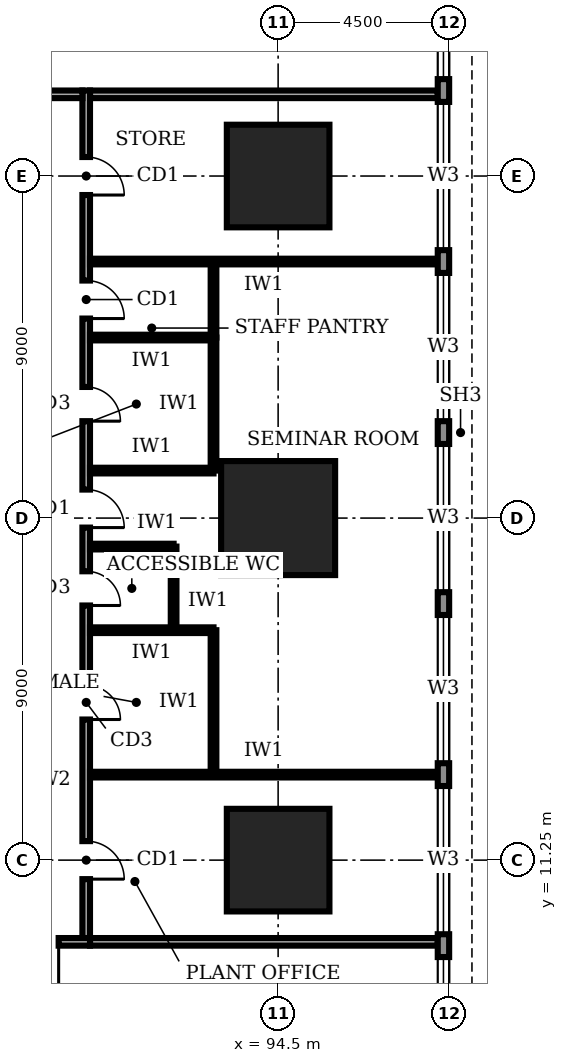
"""IFC4 building model, lengths in metres.
Left out: names, types, materials, properties, quantities, classifications, styles, units other than length and angle.
Written with IfcOpenShell. Run it as: python <this file> out.ifc"""

import sys

from ifc_helpers import new_model, si_unit, direction, frame, frame_2d, origin, origin_2d, place, context, subcontext, project, spatial, rectangle, extrude, element, fill, save


model = new_model("IFC4")
c1 = context("Model", 3, precision=1e-05, world=origin(), true_north=direction((0.0, 1.0)))
c2 = subcontext(c1, "Body", "Model", "MODEL_VIEW")
j1 = project(units=[si_unit("LENGTHUNIT", "METRE"), si_unit("PLANEANGLEUNIT", "RADIAN")], contexts=[c1])
p1 = place(None, origin())
s1 = spatial("IfcSite", under=j1, at=p1, CompositionType="ELEMENT")
p2 = place(p1, origin())
s2 = spatial("IfcBuilding", under=s1, at=p2, CompositionType="ELEMENT")
p3 = place(p2, frame((0.0, 0.0, 16.0)))
s3 = spatial("IfcBuildingStorey", under=s2, at=p3, CompositionType="ELEMENT", Elevation=16.0)
p4 = place(p3, frame((94.5, 11.25, 0.0), z_axis=(0.0, 0.0, 1.0), x_axis=(1.0, 0.0, 0.0)))
e1 = element("IfcColumn", 1, at=p4, inside=s3, PredefinedType="COLUMN", context=c2, shape_type="SweptSolid", body=[
    extrude(rectangle(XDim=2.7, YDim=2.7, at=origin_2d()), origin(), (0.0, 0.0, 1.0), 5.0),
])
p5 = place(p3, frame((94.5, 20.25, 0.0), z_axis=(0.0, 0.0, 1.0), x_axis=(1.0, 0.0, 0.0)))
e2 = element("IfcColumn", 2, at=p5, inside=s3, PredefinedType="COLUMN", context=c2, shape_type="SweptSolid", body=[
    extrude(rectangle(XDim=3.0, YDim=3.0, at=origin_2d()), origin(), (0.0, 0.0, 1.0), 5.0),
])
p6 = place(p3, frame((94.5, 29.25, 0.0), z_axis=(0.0, 0.0, 1.0), x_axis=(1.0, 0.0, 0.0)))
e3 = element("IfcColumn", 3, at=p6, inside=s3, PredefinedType="COLUMN", context=c2, shape_type="SweptSolid", body=[
    extrude(rectangle(XDim=2.7, YDim=2.7, at=origin_2d()), origin(), (0.0, 0.0, 1.0), 5.0),
])
p7 = place(p3, frame((98.85, -4.48, 0.0), z_axis=(0.0, 0.0, 1.0), x_axis=(0.0, 1.0, 0.0)))
e4 = element("IfcWall", 4, at=p7, inside=s3, PredefinedType="STANDARD", context=c2, shape_type="SweptSolid", body=[
    extrude(rectangle(XDim=53.96, YDim=0.3, at=frame_2d((26.98, 0.0))), origin(), (0.0, 0.0, 1.0), 4.7),
])
p8 = place(p7, frame((4.78, 0.0, 0.95)))
e5 = element("IfcOpeningElement", 5, at=p8, cuts=e4, PredefinedType="OPENING", context=c2, shape_type="SweptSolid", body=[
    extrude(rectangle(XDim=3.9, YDim=1.8, at=frame_2d((1.95, 0.9))), frame((0.0, 0.16, 0.0), z_axis=(0.0, -1.0, 0.0), x_axis=(1.0, 0.0, 0.0)), (0.0, 0.0, 1.0), 0.32),
])
p9 = place(p7, frame((9.28, 0.0, 0.95)))
e6 = element("IfcOpeningElement", 6, at=p9, cuts=e4, PredefinedType="OPENING", context=c2, shape_type="SweptSolid", body=[
    extrude(rectangle(XDim=3.9, YDim=1.8, at=frame_2d((1.95, 0.9))), frame((0.0, 0.16, 0.0), z_axis=(0.0, -1.0, 0.0), x_axis=(1.0, 0.0, 0.0)), (0.0, 0.0, 1.0), 0.32),
])
p10 = place(p7, frame((13.78, 0.0, 0.95)))
e7 = element("IfcOpeningElement", 7, at=p10, cuts=e4, PredefinedType="OPENING", context=c2, shape_type="SweptSolid", body=[
    extrude(rectangle(XDim=3.9, YDim=1.8, at=frame_2d((1.95, 0.9))), frame((0.0, 0.16, 0.0), z_axis=(0.0, -1.0, 0.0), x_axis=(1.0, 0.0, 0.0)), (0.0, 0.0, 1.0), 0.32),
])
p11 = place(p7, frame((18.28, 0.0, 0.95)))
e8 = element("IfcOpeningElement", 8, at=p11, cuts=e4, PredefinedType="OPENING", context=c2, shape_type="SweptSolid", body=[
    extrude(rectangle(XDim=3.9, YDim=1.8, at=frame_2d((1.95, 0.9))), frame((0.0, 0.16, 0.0), z_axis=(0.0, -1.0, 0.0), x_axis=(1.0, 0.0, 0.0)), (0.0, 0.0, 1.0), 0.32),
])
p12 = place(p7, frame((22.78, 0.0, 0.95)))
e9 = element("IfcOpeningElement", 9, at=p12, cuts=e4, PredefinedType="OPENING", context=c2, shape_type="SweptSolid", body=[
    extrude(rectangle(XDim=3.9, YDim=1.8, at=frame_2d((1.95, 0.9))), frame((0.0, 0.16, 0.0), z_axis=(0.0, -1.0, 0.0), x_axis=(1.0, 0.0, 0.0)), (0.0, 0.0, 1.0), 0.32),
])
p13 = place(p7, frame((27.28, 0.0, 0.95)))
e10 = element("IfcOpeningElement", 10, at=p13, cuts=e4, PredefinedType="OPENING", context=c2, shape_type="SweptSolid", body=[
    extrude(rectangle(XDim=3.9, YDim=1.8, at=frame_2d((1.95, 0.9))), frame((0.0, 0.16, 0.0), z_axis=(0.0, -1.0, 0.0), x_axis=(1.0, 0.0, 0.0)), (0.0, 0.0, 1.0), 0.32),
])
p14 = place(p7, frame((31.78, 0.0, 0.95)))
e11 = element("IfcOpeningElement", 11, at=p14, cuts=e4, PredefinedType="OPENING", context=c2, shape_type="SweptSolid", body=[
    extrude(rectangle(XDim=3.9, YDim=1.8, at=frame_2d((1.95, 0.9))), frame((0.0, 0.16, 0.0), z_axis=(0.0, -1.0, 0.0), x_axis=(1.0, 0.0, 0.0)), (0.0, 0.0, 1.0), 0.32),
])
p15 = place(p7, frame((36.28, 0.0, 0.95)))
e12 = element("IfcOpeningElement", 12, at=p15, cuts=e4, PredefinedType="OPENING", context=c2, shape_type="SweptSolid", body=[
    extrude(rectangle(XDim=3.9, YDim=1.8, at=frame_2d((1.95, 0.9))), frame((0.0, 0.16, 0.0), z_axis=(0.0, -1.0, 0.0), x_axis=(1.0, 0.0, 0.0)), (0.0, 0.0, 1.0), 0.32),
])
p16 = place(p7, frame((40.78, 0.0, 0.95)))
e13 = element("IfcOpeningElement", 13, at=p16, cuts=e4, PredefinedType="OPENING", context=c2, shape_type="SweptSolid", body=[
    extrude(rectangle(XDim=3.9, YDim=1.8, at=frame_2d((1.95, 0.9))), frame((0.0, 0.16, 0.0), z_axis=(0.0, -1.0, 0.0), x_axis=(1.0, 0.0, 0.0)), (0.0, 0.0, 1.0), 0.32),
])
p17 = place(p7, frame((45.28, 0.0, 0.95)))
e14 = element("IfcOpeningElement", 14, at=p17, cuts=e4, PredefinedType="OPENING", context=c2, shape_type="SweptSolid", body=[
    extrude(rectangle(XDim=3.9, YDim=1.8, at=frame_2d((1.95, 0.9))), frame((0.0, 0.16, 0.0), z_axis=(0.0, -1.0, 0.0), x_axis=(1.0, 0.0, 0.0)), (0.0, 0.0, 1.0), 0.32),
])
p18 = place(p7, frame((49.78, 0.0, 0.95)))
e15 = element("IfcOpeningElement", 15, at=p18, cuts=e4, PredefinedType="OPENING", context=c2, shape_type="SweptSolid", body=[
    extrude(rectangle(XDim=3.9, YDim=1.8, at=frame_2d((1.95, 0.9))), frame((0.0, 0.16, 0.0), z_axis=(0.0, -1.0, 0.0), x_axis=(1.0, 0.0, 0.0)), (0.0, 0.0, 1.0), 0.32),
])
p19 = place(p3, frame((72.65, 9.1, 0.0), z_axis=(0.0, 0.0, 1.0), x_axis=(1.0, 0.0, 0.0)))
e16 = element("IfcWall", 16, at=p19, inside=s3, PredefinedType="SOLIDWALL", context=c2, shape_type="SweptSolid", body=[
    extrude(rectangle(XDim=16.9, YDim=0.2, at=frame_2d((8.45, 0.0))), origin(), (0.0, 0.0, 1.0), 4.7),
])
p20 = place(p19, frame((0.925, 0.0, 0.0)))
e17 = element("IfcOpeningElement", 17, at=p20, cuts=e16, PredefinedType="OPENING", context=c2, shape_type="SweptSolid", body=[
    extrude(rectangle(XDim=1.8, YDim=2.1, at=frame_2d((0.9, 1.05))), frame((0.0, 0.11, 0.0), z_axis=(0.0, -1.0, 0.0), x_axis=(1.0, 0.0, 0.0)), (0.0, 0.0, 1.0), 0.22),
])
p21 = place(p19, frame((4.9, 0.0, 0.0)))
e18 = element("IfcOpeningElement", 18, at=p21, cuts=e16, PredefinedType="OPENING", context=c2, shape_type="SweptSolid", body=[
    extrude(rectangle(XDim=2.4, YDim=2.7, at=frame_2d((1.2, 1.35))), frame((0.0, 0.11, 0.0), z_axis=(0.0, -1.0, 0.0), x_axis=(1.0, 0.0, 0.0)), (0.0, 0.0, 1.0), 0.22),
])
p22 = place(p19, frame((9.4, 0.0, 0.0)))
e19 = element("IfcOpeningElement", 19, at=p22, cuts=e16, PredefinedType="OPENING", context=c2, shape_type="SweptSolid", body=[
    extrude(rectangle(XDim=2.4, YDim=2.7, at=frame_2d((1.2, 1.35))), frame((0.0, 0.11, 0.0), z_axis=(0.0, -1.0, 0.0), x_axis=(1.0, 0.0, 0.0)), (0.0, 0.0, 1.0), 0.22),
])
p23 = place(p19, frame((13.675, 0.0, 0.0)))
e20 = element("IfcOpeningElement", 20, at=p23, cuts=e16, PredefinedType="OPENING", context=c2, shape_type="SweptSolid", body=[
    extrude(rectangle(XDim=2.4, YDim=2.7, at=frame_2d((1.2, 1.35))), frame((0.0, 0.11, 0.0), z_axis=(0.0, -1.0, 0.0), x_axis=(1.0, 0.0, 0.0)), (0.0, 0.0, 1.0), 0.22),
])
p24 = place(p3, frame((89.45, 9.2, 0.0), z_axis=(0.0, 0.0, 1.0), x_axis=(0.0, 1.0, 0.0)))
e21 = element("IfcWall", 21, at=p24, inside=s3, PredefinedType="SOLIDWALL", context=c2, shape_type="SweptSolid", body=[
    extrude(rectangle(XDim=22.3, YDim=0.2, at=frame_2d((11.15, 0.0))), origin(), (0.0, 0.0, 1.0), 4.7),
])
p25 = place(p24, frame((1.55, 0.0, 0.0)))
e22 = element("IfcOpeningElement", 22, at=p25, cuts=e21, PredefinedType="OPENING", context=c2, shape_type="SweptSolid", body=[
    extrude(rectangle(XDim=1.0, YDim=2.1, at=frame_2d((0.5, 1.05))), frame((0.0, 0.11, 0.0), z_axis=(0.0, -1.0, 0.0), x_axis=(1.0, 0.0, 0.0)), (0.0, 0.0, 1.0), 0.22),
])
p26 = place(p24, frame((5.75, 0.0, 0.0)))
e23 = element("IfcOpeningElement", 23, at=p26, cuts=e21, PredefinedType="OPENING", context=c2, shape_type="SweptSolid", body=[
    extrude(rectangle(XDim=0.9, YDim=2.1, at=frame_2d((0.45, 1.05))), frame((0.0, 0.11, 0.0), z_axis=(0.0, -1.0, 0.0), x_axis=(1.0, 0.0, 0.0)), (0.0, 0.0, 1.0), 0.22),
])
p27 = place(p24, frame((8.75, 0.0, 0.0)))
e24 = element("IfcOpeningElement", 24, at=p27, cuts=e21, PredefinedType="OPENING", context=c2, shape_type="SweptSolid", body=[
    extrude(rectangle(XDim=0.9, YDim=2.1, at=frame_2d((0.45, 1.05))), frame((0.0, 0.11, 0.0), z_axis=(0.0, -1.0, 0.0), x_axis=(1.0, 0.0, 0.0)), (0.0, 0.0, 1.0), 0.22),
])
p28 = place(p24, frame((13.6, 0.0, 0.0)))
e25 = element("IfcOpeningElement", 25, at=p28, cuts=e21, PredefinedType="OPENING", context=c2, shape_type="SweptSolid", body=[
    extrude(rectangle(XDim=0.9, YDim=2.1, at=frame_2d((0.45, 1.05))), frame((0.0, 0.11, 0.0), z_axis=(0.0, -1.0, 0.0), x_axis=(1.0, 0.0, 0.0)), (0.0, 0.0, 1.0), 0.22),
])
p29 = place(p24, frame((16.3, 0.0, 0.0)))
e26 = element("IfcOpeningElement", 26, at=p29, cuts=e21, PredefinedType="OPENING", context=c2, shape_type="SweptSolid", body=[
    extrude(rectangle(XDim=1.0, YDim=2.1, at=frame_2d((0.5, 1.05))), frame((0.0, 0.11, 0.0), z_axis=(0.0, -1.0, 0.0), x_axis=(1.0, 0.0, 0.0)), (0.0, 0.0, 1.0), 0.22),
])
p30 = place(p24, frame((10.8, 0.0, 0.0)))
e27 = element("IfcOpeningElement", 27, at=p30, cuts=e21, PredefinedType="OPENING", context=c2, shape_type="SweptSolid", body=[
    extrude(rectangle(XDim=1.0, YDim=2.1, at=frame_2d((0.5, 1.05))), frame((0.0, 0.11, 0.0), z_axis=(0.0, -1.0, 0.0), x_axis=(1.0, 0.0, 0.0)), (0.0, 0.0, 1.0), 0.22),
])
p31 = place(p24, frame((19.55, 0.0, 0.0)))
e28 = element("IfcOpeningElement", 28, at=p31, cuts=e21, PredefinedType="OPENING", context=c2, shape_type="SweptSolid", body=[
    extrude(rectangle(XDim=1.0, YDim=2.1, at=frame_2d((0.5, 1.05))), frame((0.0, 0.11, 0.0), z_axis=(0.0, -1.0, 0.0), x_axis=(1.0, 0.0, 0.0)), (0.0, 0.0, 1.0), 0.22),
])
p32 = place(p3, frame((89.35, 31.4, 0.0), z_axis=(0.0, 0.0, 1.0), x_axis=(-1.0, 0.0, 0.0)))
e29 = element("IfcWall", 29, at=p32, inside=s3, PredefinedType="SOLIDWALL", context=c2, shape_type="SweptSolid", body=[
    extrude(rectangle(XDim=16.9, YDim=0.2, at=frame_2d((8.45, 0.0))), origin(), (0.0, 0.0, 1.0), 4.7),
])
p33 = place(p32, frame((13.925, 0.0, 0.0)))
e30 = element("IfcOpeningElement", 30, at=p33, cuts=e29, PredefinedType="OPENING", context=c2, shape_type="SweptSolid", body=[
    extrude(rectangle(XDim=1.8, YDim=2.1, at=frame_2d((0.9, 1.05))), frame((0.0, 0.11, 0.0), z_axis=(0.0, -1.0, 0.0), x_axis=(1.0, 0.0, 0.0)), (0.0, 0.0, 1.0), 0.22),
])
p34 = place(p32, frame((9.4, 0.0, 0.0)))
e31 = element("IfcOpeningElement", 31, at=p34, cuts=e29, PredefinedType="OPENING", context=c2, shape_type="SweptSolid", body=[
    extrude(rectangle(XDim=2.4, YDim=2.7, at=frame_2d((1.2, 1.35))), frame((0.0, 0.11, 0.0), z_axis=(0.0, -1.0, 0.0), x_axis=(1.0, 0.0, 0.0)), (0.0, 0.0, 1.0), 0.22),
])
p35 = place(p32, frame((0.925, 0.0, 0.0)))
e32 = element("IfcOpeningElement", 32, at=p35, cuts=e29, PredefinedType="OPENING", context=c2, shape_type="SweptSolid", body=[
    extrude(rectangle(XDim=1.8, YDim=2.1, at=frame_2d((0.9, 1.05))), frame((0.0, 0.11, 0.0), z_axis=(0.0, -1.0, 0.0), x_axis=(1.0, 0.0, 0.0)), (0.0, 0.0, 1.0), 0.22),
])
p36 = place(p32, frame((5.6, 0.0, 0.0)))
e33 = element("IfcOpeningElement", 33, at=p36, cuts=e29, PredefinedType="OPENING", context=c2, shape_type="SweptSolid", body=[
    extrude(rectangle(XDim=1.0, YDim=2.1, at=frame_2d((0.5, 1.05))), frame((0.0, 0.11, 0.0), z_axis=(0.0, -1.0, 0.0), x_axis=(1.0, 0.0, 0.0)), (0.0, 0.0, 1.0), 0.22),
])
for number, where, z_axis, x_axis in (
    (34, (89.55, 9.1, 0.0), (0.0, 0.0, 1.0), (1.0, 0.0, 0.0)),
    (35, (89.55, 31.4, 0.0), (0.0, 0.0, 1.0), (1.0, 0.0, 0.0)),
):
    element("IfcWall", number, at=place(p3, frame(where, z_axis=z_axis, x_axis=x_axis)), inside=s3, PredefinedType="SOLIDWALL", context=c2, shape_type="SweptSolid", body=[
        extrude(rectangle(XDim=9.15, YDim=0.2, at=frame_2d((4.575, 0.0))), origin(), (0.0, 0.0, 1.0), 4.7),
    ])
for number, where, z_axis, x_axis in (
    (36, (89.55, 13.5, 0.0), (0.0, 0.0, 1.0), (1.0, 0.0, 0.0)),
    (37, (89.55, 27.0, 0.0), (0.0, 0.0, 1.0), (1.0, 0.0, 0.0)),
):
    element("IfcWall", number, at=place(p3, frame(where, z_axis=z_axis, x_axis=x_axis)), inside=s3, PredefinedType="PARTITIONING", context=c2, shape_type="SweptSolid", body=[
        extrude(rectangle(XDim=9.15, YDim=0.15, at=frame_2d((4.575, 0.0))), origin(), (0.0, 0.0, 1.0), 4.7),
    ])
p37 = place(p3, frame((89.55, 17.3, 0.0), z_axis=(0.0, 0.0, 1.0), x_axis=(1.0, 0.0, 0.0)))
e38 = element("IfcWall", 38, at=p37, inside=s3, PredefinedType="PARTITIONING", context=c2, shape_type="SweptSolid", body=[
    extrude(rectangle(XDim=3.25, YDim=0.15, at=frame_2d((1.625, 0.0))), origin(), (0.0, 0.0, 1.0), 4.7),
])
p38 = place(p3, frame((89.55, 19.5, 0.0), z_axis=(0.0, 0.0, 1.0), x_axis=(1.0, 0.0, 0.0)))
e39 = element("IfcWall", 39, at=p38, inside=s3, PredefinedType="PARTITIONING", context=c2, shape_type="SweptSolid", body=[
    extrude(rectangle(XDim=2.2, YDim=0.15, at=frame_2d((1.1, 0.0))), origin(), (0.0, 0.0, 1.0), 3.8),
])
for number, where, z_axis, x_axis in (
    (40, (89.55, 21.5, 0.0), (0.0, 0.0, 1.0), (1.0, 0.0, 0.0)),
    (41, (89.55, 25.0, 0.0), (0.0, 0.0, 1.0), (1.0, 0.0, 0.0)),
):
    element("IfcWall", number, at=place(p3, frame(where, z_axis=z_axis, x_axis=x_axis)), inside=s3, PredefinedType="PARTITIONING", context=c2, shape_type="SweptSolid", body=[
        extrude(rectangle(XDim=3.25, YDim=0.15, at=frame_2d((1.625, 0.0))), origin(), (0.0, 0.0, 1.0), 4.7),
    ])
p39 = place(p3, frame((92.8, 13.5, 0.0), z_axis=(0.0, 0.0, 1.0), x_axis=(0.0, 1.0, 0.0)))
e42 = element("IfcWall", 42, at=p39, inside=s3, PredefinedType="PARTITIONING", context=c2, shape_type="SweptSolid", body=[
    extrude(rectangle(XDim=3.8, YDim=0.15, at=frame_2d((1.9, 0.0))), origin(), (0.0, 0.0, 1.0), 4.7),
])
p40 = place(p3, frame((91.75, 17.3, 0.0), z_axis=(0.0, 0.0, 1.0), x_axis=(0.0, 1.0, 0.0)))
e43 = element("IfcWall", 43, at=p40, inside=s3, PredefinedType="PARTITIONING", context=c2, shape_type="SweptSolid", body=[
    extrude(rectangle(XDim=2.2, YDim=0.15, at=frame_2d((1.1, 0.0))), origin(), (0.0, 0.0, 1.0), 4.7),
])
p41 = place(p3, frame((92.8, 21.5, 0.0), z_axis=(0.0, 0.0, 1.0), x_axis=(0.0, 1.0, 0.0)))
e44 = element("IfcWall", 44, at=p41, inside=s3, PredefinedType="PARTITIONING", context=c2, shape_type="SweptSolid", body=[
    extrude(rectangle(XDim=3.5, YDim=0.15, at=frame_2d((1.75, 0.0))), origin(), (0.0, 0.0, 1.0), 4.7),
])
p42 = place(p3, frame((92.8, 25.0, 0.0), z_axis=(0.0, 0.0, 1.0), x_axis=(0.0, 1.0, 0.0)))
e45 = element("IfcWall", 45, at=p42, inside=s3, PredefinedType="PARTITIONING", context=c2, shape_type="SweptSolid", body=[
    extrude(rectangle(XDim=2.0, YDim=0.15, at=frame_2d((1.0, 0.0))), origin(), (0.0, 0.0, 1.0), 4.7),
])
p43 = place(p9, origin())
e46 = element("IfcWindow", 46, at=p43, inside=s3, PartitioningType="SINGLE_PANEL", PredefinedType="WINDOW", context=c2, shape_type="SweptSolid", body=[
    extrude(rectangle(XDim=3.9, YDim=1.8, at=frame_2d((1.95, 0.9))), frame((0.0, 0.03, 0.0), z_axis=(0.0, -1.0, 0.0), x_axis=(1.0, 0.0, 0.0)), (0.0, 0.0, 1.0), 0.06),
])
fill(e6, e46)
p44 = place(p10, origin())
e47 = element("IfcWindow", 47, at=p44, inside=s3, PartitioningType="SINGLE_PANEL", PredefinedType="WINDOW", context=c2, shape_type="SweptSolid", body=[
    extrude(rectangle(XDim=3.9, YDim=1.8, at=frame_2d((1.95, 0.9))), frame((0.0, 0.03, 0.0), z_axis=(0.0, -1.0, 0.0), x_axis=(1.0, 0.0, 0.0)), (0.0, 0.0, 1.0), 0.06),
])
fill(e7, e47)
p45 = place(p11, origin())
e48 = element("IfcWindow", 48, at=p45, inside=s3, PartitioningType="SINGLE_PANEL", PredefinedType="WINDOW", context=c2, shape_type="SweptSolid", body=[
    extrude(rectangle(XDim=3.9, YDim=1.8, at=frame_2d((1.95, 0.9))), frame((0.0, 0.03, 0.0), z_axis=(0.0, -1.0, 0.0), x_axis=(1.0, 0.0, 0.0)), (0.0, 0.0, 1.0), 0.06),
])
fill(e8, e48)
p46 = place(p12, origin())
e49 = element("IfcWindow", 49, at=p46, inside=s3, PartitioningType="SINGLE_PANEL", PredefinedType="WINDOW", context=c2, shape_type="SweptSolid", body=[
    extrude(rectangle(XDim=3.9, YDim=1.8, at=frame_2d((1.95, 0.9))), frame((0.0, 0.03, 0.0), z_axis=(0.0, -1.0, 0.0), x_axis=(1.0, 0.0, 0.0)), (0.0, 0.0, 1.0), 0.06),
])
fill(e9, e49)
p47 = place(p13, origin())
e50 = element("IfcWindow", 50, at=p47, inside=s3, PartitioningType="SINGLE_PANEL", PredefinedType="WINDOW", context=c2, shape_type="SweptSolid", body=[
    extrude(rectangle(XDim=3.9, YDim=1.8, at=frame_2d((1.95, 0.9))), frame((0.0, 0.03, 0.0), z_axis=(0.0, -1.0, 0.0), x_axis=(1.0, 0.0, 0.0)), (0.0, 0.0, 1.0), 0.06),
])
fill(e10, e50)
p48 = place(p14, origin())
e51 = element("IfcWindow", 51, at=p48, inside=s3, PartitioningType="SINGLE_PANEL", PredefinedType="WINDOW", context=c2, shape_type="SweptSolid", body=[
    extrude(rectangle(XDim=3.9, YDim=1.8, at=frame_2d((1.95, 0.9))), frame((0.0, 0.03, 0.0), z_axis=(0.0, -1.0, 0.0), x_axis=(1.0, 0.0, 0.0)), (0.0, 0.0, 1.0), 0.06),
])
fill(e11, e51)
p49 = place(p15, origin())
e52 = element("IfcWindow", 52, at=p49, inside=s3, PartitioningType="SINGLE_PANEL", PredefinedType="WINDOW", context=c2, shape_type="SweptSolid", body=[
    extrude(rectangle(XDim=3.9, YDim=1.8, at=frame_2d((1.95, 0.9))), frame((0.0, 0.03, 0.0), z_axis=(0.0, -1.0, 0.0), x_axis=(1.0, 0.0, 0.0)), (0.0, 0.0, 1.0), 0.06),
])
fill(e12, e52)
p50 = place(p23, frame((2.4, 0.0, 0.0), z_axis=(0.0, 0.0, 1.0), x_axis=(-1.0, 0.0, 0.0)))
e53 = element("IfcDoor", 53, at=p50, inside=s3, OperationType="DOUBLE_DOOR_SINGLE_SWING", PredefinedType="DOOR", context=c2, shape_type="SweptSolid", body=[
    extrude(rectangle(XDim=2.4, YDim=2.7, at=frame_2d((1.2, 1.35))), frame((0.0, 0.025, 0.0), z_axis=(0.0, -1.0, 0.0), x_axis=(1.0, 0.0, 0.0)), (0.0, 0.0, 1.0), 0.05),
])
fill(e20, e53)
p51 = place(p25, frame((1.0, 0.0, 0.0), z_axis=(0.0, 0.0, 1.0), x_axis=(-1.0, 0.0, 0.0)))
e54 = element("IfcDoor", 54, at=p51, inside=s3, OperationType="SINGLE_SWING_RIGHT", PredefinedType="DOOR", context=c2, shape_type="SweptSolid", body=[
    extrude(rectangle(XDim=1.0, YDim=2.1, at=frame_2d((0.5, 1.05))), frame((0.0, 0.025, 0.0), z_axis=(0.0, -1.0, 0.0), x_axis=(1.0, 0.0, 0.0)), (0.0, 0.0, 1.0), 0.05),
])
fill(e22, e54)
p52 = place(p26, frame((0.9, 0.0, 0.0), z_axis=(0.0, 0.0, 1.0), x_axis=(-1.0, 0.0, 0.0)))
e55 = element("IfcDoor", 55, at=p52, inside=s3, OperationType="SINGLE_SWING_RIGHT", PredefinedType="DOOR", context=c2, shape_type="SweptSolid", body=[
    extrude(rectangle(XDim=0.9, YDim=2.1, at=frame_2d((0.45, 1.05))), frame((0.0, 0.025, 0.0), z_axis=(0.0, -1.0, 0.0), x_axis=(1.0, 0.0, 0.0)), (0.0, 0.0, 1.0), 0.05),
])
fill(e23, e55)
p53 = place(p27, frame((0.9, 0.0, 0.0), z_axis=(0.0, 0.0, 1.0), x_axis=(-1.0, 0.0, 0.0)))
e56 = element("IfcDoor", 56, at=p53, inside=s3, OperationType="SINGLE_SWING_RIGHT", PredefinedType="DOOR", context=c2, shape_type="SweptSolid", body=[
    extrude(rectangle(XDim=0.9, YDim=2.1, at=frame_2d((0.45, 1.05))), frame((0.0, 0.025, 0.0), z_axis=(0.0, -1.0, 0.0), x_axis=(1.0, 0.0, 0.0)), (0.0, 0.0, 1.0), 0.05),
])
fill(e24, e56)
p54 = place(p28, frame((0.9, 0.0, 0.0), z_axis=(0.0, 0.0, 1.0), x_axis=(-1.0, 0.0, 0.0)))
e57 = element("IfcDoor", 57, at=p54, inside=s3, OperationType="SINGLE_SWING_RIGHT", PredefinedType="DOOR", context=c2, shape_type="SweptSolid", body=[
    extrude(rectangle(XDim=0.9, YDim=2.1, at=frame_2d((0.45, 1.05))), frame((0.0, 0.025, 0.0), z_axis=(0.0, -1.0, 0.0), x_axis=(1.0, 0.0, 0.0)), (0.0, 0.0, 1.0), 0.05),
])
fill(e25, e57)
p55 = place(p29, frame((1.0, 0.0, 0.0), z_axis=(0.0, 0.0, 1.0), x_axis=(-1.0, 0.0, 0.0)))
e58 = element("IfcDoor", 58, at=p55, inside=s3, OperationType="SINGLE_SWING_RIGHT", PredefinedType="DOOR", context=c2, shape_type="SweptSolid", body=[
    extrude(rectangle(XDim=1.0, YDim=2.1, at=frame_2d((0.5, 1.05))), frame((0.0, 0.025, 0.0), z_axis=(0.0, -1.0, 0.0), x_axis=(1.0, 0.0, 0.0)), (0.0, 0.0, 1.0), 0.05),
])
fill(e26, e58)
p56 = place(p30, frame((1.0, 0.0, 0.0), z_axis=(0.0, 0.0, 1.0), x_axis=(-1.0, 0.0, 0.0)))
e59 = element("IfcDoor", 59, at=p56, inside=s3, OperationType="SINGLE_SWING_RIGHT", PredefinedType="DOOR", context=c2, shape_type="SweptSolid", body=[
    extrude(rectangle(XDim=1.0, YDim=2.1, at=frame_2d((0.5, 1.05))), frame((0.0, 0.025, 0.0), z_axis=(0.0, -1.0, 0.0), x_axis=(1.0, 0.0, 0.0)), (0.0, 0.0, 1.0), 0.05),
])
fill(e27, e59)
p57 = place(p31, frame((1.0, 0.0, 0.0), z_axis=(0.0, 0.0, 1.0), x_axis=(-1.0, 0.0, 0.0)))
e60 = element("IfcDoor", 60, at=p57, inside=s3, OperationType="SINGLE_SWING_RIGHT", PredefinedType="DOOR", context=c2, shape_type="SweptSolid", body=[
    extrude(rectangle(XDim=1.0, YDim=2.1, at=frame_2d((0.5, 1.05))), frame((0.0, 0.025, 0.0), z_axis=(0.0, -1.0, 0.0), x_axis=(1.0, 0.0, 0.0)), (0.0, 0.0, 1.0), 0.05),
])
fill(e28, e60)
save(model, sys.argv[1])
